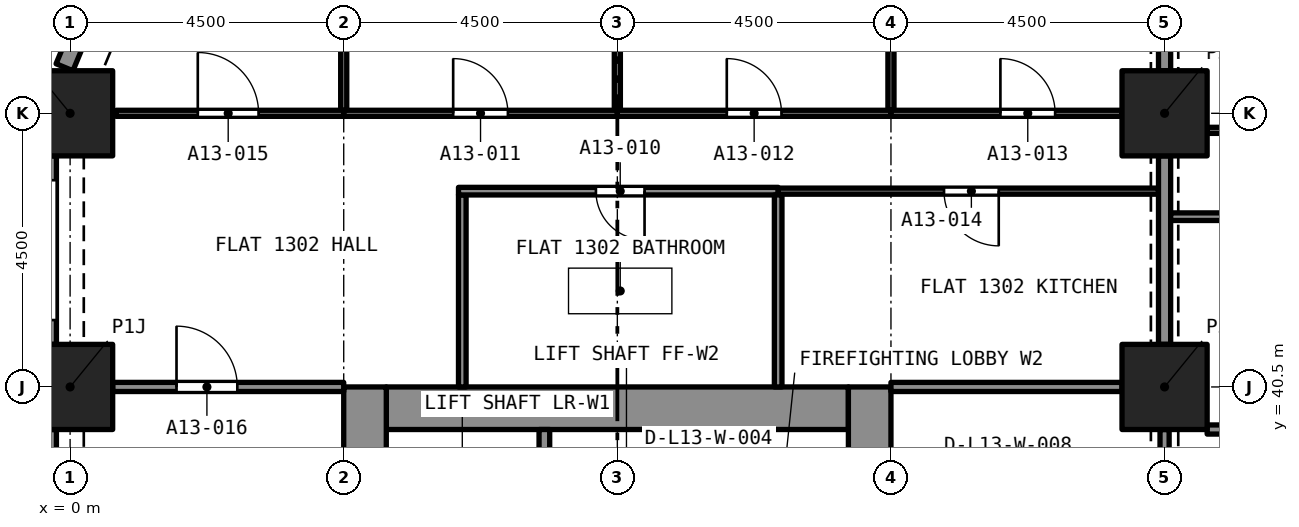
"""IFC4 building model, lengths in metres.
Left out: names, types, materials, properties, quantities, classifications, styles, units other than length and angle.
Written with IfcOpenShell. Run it as: python <this file> out.ifc"""

import sys

from ifc_helpers import new_model, si_unit, direction, frame, frame_2d, origin, origin_2d, place, context, subcontext, project, spatial, rectangle, extrude, element, fill, save


model = new_model("IFC4")
c1 = context("Model", 3, precision=1e-05, world=origin(), true_north=direction((0.0, 1.0)))
c2 = subcontext(c1, "Body", "Model", "MODEL_VIEW")
j1 = project(units=[si_unit("LENGTHUNIT", "METRE"), si_unit("PLANEANGLEUNIT", "RADIAN")], contexts=[c1])
p1 = place(None, origin())
s1 = spatial("IfcSite", under=j1, at=p1, CompositionType="ELEMENT")
p2 = place(p1, origin())
s2 = spatial("IfcBuilding", under=s1, at=p2, CompositionType="ELEMENT")
p3 = place(p2, frame((0.0, 0.0, 52.8)))
s3 = spatial("IfcBuildingStorey", under=s2, at=p3, CompositionType="ELEMENT", Elevation=52.8)
for number, where, z_axis, x_axis in (
    (1, (0.0, 40.5, 0.0), (0.0, 0.0, 1.0), (1.0, 0.0, 0.0)),
    (2, (18.0, 40.5, 0.0), (0.0, 0.0, 1.0), (1.0, 0.0, 0.0)),
    (3, (0.0, 45.0, 0.0), (0.0, 0.0, 1.0), (1.0, 0.0, 0.0)),
    (4, (18.0, 45.0, 0.0), (0.0, 0.0, 1.0), (1.0, 0.0, 0.0)),
):
    element("IfcColumn", number, at=place(p3, frame(where, z_axis=z_axis, x_axis=x_axis)), inside=s3, PredefinedType="COLUMN", context=c2, shape_type="SweptSolid", body=[
        extrude(rectangle(XDim=1.4, YDim=1.4, at=origin_2d()), origin(), (0.0, 0.0, 1.0), 3.2),
    ])
p4 = place(p3, frame((5.2, 40.15, 0.0), z_axis=(0.0, 0.0, 1.0), x_axis=(1.0, 0.0, 0.0)))
e5 = element("IfcWall", 5, at=p4, inside=s3, PredefinedType="SOLIDWALL", context=c2, shape_type="SweptSolid", body=[
    extrude(rectangle(XDim=7.6, YDim=0.7, at=frame_2d((3.8, 0.0))), origin(), (0.0, 0.0, 1.0), 3.2),
])
p5 = place(p3, frame((4.85, 27.0, 0.0), z_axis=(0.0, 0.0, 1.0), x_axis=(0.0, 1.0, 0.0)))
e6 = element("IfcWall", 6, at=p5, inside=s3, PredefinedType="SOLIDWALL", context=c2, shape_type="SweptSolid", body=[
    extrude(rectangle(XDim=13.5, YDim=0.7, at=frame_2d((6.75, 0.0))), origin(), (0.0, 0.0, 1.0), 3.2),
])
p6 = place(p5, frame((8.95, 0.0, 0.0)))
e7 = element("IfcOpeningElement", 7, at=p6, cuts=e6, PredefinedType="OPENING", context=c2, shape_type="SweptSolid", body=[
    extrude(rectangle(XDim=1.2, YDim=2.1, at=frame_2d((0.6, 1.05))), frame((0.0, 0.36, 0.0), z_axis=(0.0, -1.0, 0.0), x_axis=(1.0, 0.0, 0.0)), (0.0, 0.0, 1.0), 0.72),
])
p7 = place(p3, frame((13.15, 27.0, 0.0), z_axis=(0.0, 0.0, 1.0), x_axis=(0.0, 1.0, 0.0)))
e8 = element("IfcWall", 8, at=p7, inside=s3, PredefinedType="SOLIDWALL", context=c2, shape_type="SweptSolid", body=[
    extrude(rectangle(XDim=13.5, YDim=0.7, at=frame_2d((6.75, 0.0))), origin(), (0.0, 0.0, 1.0), 3.2),
])
p8 = place(p7, frame((11.1, 0.0, 0.0)))
e9 = element("IfcOpeningElement", 9, at=p8, cuts=e8, PredefinedType="OPENING", context=c2, shape_type="SweptSolid", body=[
    extrude(rectangle(XDim=1.1, YDim=2.1, at=frame_2d((0.55, 1.05))), frame((0.0, 0.36, 0.0), z_axis=(0.0, -1.0, 0.0), x_axis=(1.0, 0.0, 0.0)), (0.0, 0.0, 1.0), 0.72),
])
p9 = place(p7, frame((8.95, 0.0, 0.0)))
e10 = element("IfcOpeningElement", 10, at=p9, cuts=e8, PredefinedType="OPENING", context=c2, shape_type="SweptSolid", body=[
    extrude(rectangle(XDim=1.2, YDim=2.1, at=frame_2d((0.6, 1.05))), frame((0.0, 0.36, 0.0), z_axis=(0.0, -1.0, 0.0), x_axis=(1.0, 0.0, 0.0)), (0.0, 0.0, 1.0), 0.72),
])
p10 = place(p3, frame((-0.092, 45.757, 0.0), z_axis=(0.0, 0.0, 1.0), x_axis=(0.382737135771, 0.923857286003, 0.0)))
e11 = element("IfcWall", 11, at=p10, inside=s3, PredefinedType="SOLIDWALL", context=c2, shape_type="SweptSolid", body=[
    extrude(rectangle(XDim=1.865, YDim=0.3, at=frame_2d((0.933, 0.0))), origin(), (0.0, 0.0, 1.0), 3.2),
])
p11 = place(p10, frame((0.508, 0.0, 0.45)))
e12 = element("IfcOpeningElement", 12, at=p11, cuts=e11, PredefinedType="OPENING", context=c2, shape_type="SweptSolid", body=[
    extrude(rectangle(XDim=1.1, YDim=1.95, at=frame_2d((0.55, 0.975))), frame((0.0, 0.16, 0.0), z_axis=(0.0, -1.0, 0.0), x_axis=(1.0, 0.0, 0.0)), (0.0, 0.0, 1.0), 0.32),
])
p12 = place(p3, frame((-0.375, 41.2, 0.0), z_axis=(0.0, 0.0, 1.0), x_axis=(0.0, 1.0, 0.0)))
e13 = element("IfcWall", 13, at=p12, inside=s3, PredefinedType="SOLIDWALL", context=c2, shape_type="SweptSolid", body=[
    extrude(rectangle(XDim=3.1, YDim=0.3, at=frame_2d((1.55, 0.0))), origin(), (0.0, 0.0, 1.0), 3.2),
])
p13 = place(p12, frame((0.4, 0.0, 0.45)))
e14 = element("IfcOpeningElement", 14, at=p13, cuts=e13, PredefinedType="OPENING", context=c2, shape_type="SweptSolid", body=[
    extrude(rectangle(XDim=2.3, YDim=1.95, at=frame_2d((1.15, 0.975))), frame((0.0, 0.16, 0.0), z_axis=(0.0, -1.0, 0.0), x_axis=(1.0, 0.0, 0.0)), (0.0, 0.0, 1.0), 0.32),
])
p14 = place(p3, frame((-0.375, 36.7, 0.0), z_axis=(0.0, 0.0, 1.0), x_axis=(0.0, 1.0, 0.0)))
e15 = element("IfcWall", 15, at=p14, inside=s3, PredefinedType="SOLIDWALL", context=c2, shape_type="SweptSolid", body=[
    extrude(rectangle(XDim=3.1, YDim=0.3, at=frame_2d((1.55, 0.0))), origin(), (0.0, 0.0, 1.0), 3.2),
])
p15 = place(p14, frame((0.4, 0.0, 0.45)))
e16 = element("IfcOpeningElement", 16, at=p15, cuts=e15, PredefinedType="OPENING", context=c2, shape_type="SweptSolid", body=[
    extrude(rectangle(XDim=2.3, YDim=1.95, at=frame_2d((1.15, 0.975))), frame((0.0, 0.16, 0.0), z_axis=(0.0, -1.0, 0.0), x_axis=(1.0, 0.0, 0.0)), (0.0, 0.0, 1.0), 0.32),
])
p16 = place(p3, frame((6.45, 40.5, 0.0), z_axis=(0.0, 0.0, 1.0), x_axis=(0.0, 1.0, 0.0)))
e17 = element("IfcWall", 17, at=p16, inside=s3, PredefinedType="PARTITIONING", context=c2, shape_type="SweptSolid", body=[
    extrude(rectangle(XDim=3.157, YDim=0.125, at=frame_2d((1.579, 0.0))), origin(), (0.0, 0.0, 1.0), 2.9),
])
p17 = place(p3, frame((11.645, 43.72, 0.0), z_axis=(0.0, 0.0, 1.0), x_axis=(-1.0, 0.0, 0.0)))
e18 = element("IfcWall", 18, at=p17, inside=s3, PredefinedType="PARTITIONING", context=c2, shape_type="SweptSolid", body=[
    extrude(rectangle(XDim=5.258, YDim=0.125, at=frame_2d((2.629, 0.0))), origin(), (0.0, 0.0, 1.0), 2.9),
])
p18 = place(p17, frame((2.198, 0.0, 0.0)))
e19 = element("IfcOpeningElement", 19, at=p18, cuts=e18, PredefinedType="OPENING", context=c2, shape_type="SweptSolid", body=[
    extrude(rectangle(XDim=0.8, YDim=2.1, at=frame_2d((0.4, 1.05))), frame((0.0, 0.073, 0.0), z_axis=(0.0, -1.0, 0.0), x_axis=(1.0, 0.0, 0.0)), (0.0, 0.0, 1.0), 0.145),
])
p19 = place(p3, frame((11.645, 40.5, 0.0), z_axis=(0.0, 0.0, 1.0), x_axis=(0.0, 1.0, 0.0)))
e20 = element("IfcWall", 20, at=p19, inside=s3, PredefinedType="PARTITIONING", context=c2, shape_type="SweptSolid", body=[
    extrude(rectangle(XDim=3.157, YDim=0.125, at=frame_2d((1.579, 0.0))), origin(), (0.0, 0.0, 1.0), 2.9),
])
p20 = place(p3, frame((9.0, 45.05, 0.0), z_axis=(0.0, 0.0, 1.0), x_axis=(0.0, 1.0, 0.0)))
e21 = element("IfcWall", 21, at=p20, inside=s3, PredefinedType="PARTITIONING", context=c2, shape_type="SweptSolid", body=[
    extrude(rectangle(XDim=3.75, YDim=0.1, at=frame_2d((1.875, 0.0))), origin(), (0.0, 0.0, 1.0), 2.9),
])
p21 = place(p3, frame((4.5, 45.0, 0.0), z_axis=(0.0, 0.0, 1.0), x_axis=(1.0, 0.0, 0.0)))
e22 = element("IfcWall", 22, at=p21, inside=s3, PredefinedType="PARTITIONING", context=c2, shape_type="SweptSolid", body=[
    extrude(rectangle(XDim=4.5, YDim=0.1, at=frame_2d((2.25, 0.0))), origin(), (0.0, 0.0, 1.0), 2.9),
])
p22 = place(p21, frame((1.8, 0.0, 0.0)))
e23 = element("IfcOpeningElement", 23, at=p22, cuts=e22, PredefinedType="OPENING", context=c2, shape_type="SweptSolid", body=[
    extrude(rectangle(XDim=0.9, YDim=2.1, at=frame_2d((0.45, 1.05))), frame((0.0, 0.06, 0.0), z_axis=(0.0, -1.0, 0.0), x_axis=(1.0, 0.0, 0.0)), (0.0, 0.0, 1.0), 0.12),
])
p23 = place(p3, frame((4.5, 45.05, 0.0), z_axis=(0.0, 0.0, 1.0), x_axis=(0.0, 1.0, 0.0)))
e24 = element("IfcWall", 24, at=p23, inside=s3, PredefinedType="PARTITIONING", context=c2, shape_type="SweptSolid", body=[
    extrude(rectangle(XDim=3.692, YDim=0.1, at=frame_2d((1.846, 0.0))), origin(), (0.0, 0.0, 1.0), 2.9),
])
p24 = place(p3, frame((13.5, 45.05, 0.0), z_axis=(0.0, 0.0, 1.0), x_axis=(0.0, 1.0, 0.0)))
e25 = element("IfcWall", 25, at=p24, inside=s3, PredefinedType="PARTITIONING", context=c2, shape_type="SweptSolid", body=[
    extrude(rectangle(XDim=3.75, YDim=0.1, at=frame_2d((1.875, 0.0))), origin(), (0.0, 0.0, 1.0), 2.9),
])
p25 = place(p3, frame((9.0, 45.0, 0.0), z_axis=(0.0, 0.0, 1.0), x_axis=(1.0, 0.0, 0.0)))
e26 = element("IfcWall", 26, at=p25, inside=s3, PredefinedType="PARTITIONING", context=c2, shape_type="SweptSolid", body=[
    extrude(rectangle(XDim=4.5, YDim=0.1, at=frame_2d((2.25, 0.0))), origin(), (0.0, 0.0, 1.0), 2.9),
])
p26 = place(p25, frame((1.8, 0.0, 0.0)))
e27 = element("IfcOpeningElement", 27, at=p26, cuts=e26, PredefinedType="OPENING", context=c2, shape_type="SweptSolid", body=[
    extrude(rectangle(XDim=0.9, YDim=2.1, at=frame_2d((0.45, 1.05))), frame((0.0, 0.06, 0.0), z_axis=(0.0, -1.0, 0.0), x_axis=(1.0, 0.0, 0.0)), (0.0, 0.0, 1.0), 0.12),
])
p27 = place(p3, frame((13.5, 45.0, 0.0), z_axis=(0.0, 0.0, 1.0), x_axis=(1.0, 0.0, 0.0)))
e28 = element("IfcWall", 28, at=p27, inside=s3, PredefinedType="PARTITIONING", context=c2, shape_type="SweptSolid", body=[
    extrude(rectangle(XDim=3.8, YDim=0.1, at=frame_2d((1.9, 0.0))), origin(), (0.0, 0.0, 1.0), 2.9),
])
p28 = place(p27, frame((1.8, 0.0, 0.0)))
e29 = element("IfcOpeningElement", 29, at=p28, cuts=e28, PredefinedType="OPENING", context=c2, shape_type="SweptSolid", body=[
    extrude(rectangle(XDim=0.9, YDim=2.1, at=frame_2d((0.45, 1.05))), frame((0.0, 0.06, 0.0), z_axis=(0.0, -1.0, 0.0), x_axis=(1.0, 0.0, 0.0)), (0.0, 0.0, 1.0), 0.12),
])
p29 = place(p3, frame((18.0, 45.7, 0.0), z_axis=(0.0, 0.0, 1.0), x_axis=(0.0, 1.0, 0.0)))
e30 = element("IfcWall", 30, at=p29, inside=s3, PredefinedType="PARTITIONING", context=c2, shape_type="SweptSolid", body=[
    extrude(rectangle(XDim=3.1, YDim=0.2, at=frame_2d((1.55, 0.0))), origin(), (0.0, 0.0, 1.0), 2.38),
])
p30 = place(p3, frame((17.9, 43.72, 0.0), z_axis=(0.0, 0.0, 1.0), x_axis=(-1.0, 0.0, 0.0)))
e31 = element("IfcWall", 31, at=p30, inside=s3, PredefinedType="PARTITIONING", context=c2, shape_type="SweptSolid", body=[
    extrude(rectangle(XDim=6.255, YDim=0.1, at=frame_2d((3.127, 0.0))), origin(), (0.0, 0.0, 1.0), 2.9),
])
p31 = place(p30, frame((2.627, 0.0, 0.0)))
e32 = element("IfcOpeningElement", 32, at=p31, cuts=e31, PredefinedType="OPENING", context=c2, shape_type="SweptSolid", body=[
    extrude(rectangle(XDim=0.9, YDim=2.1, at=frame_2d((0.45, 1.05))), frame((0.0, 0.06, 0.0), z_axis=(0.0, -1.0, 0.0), x_axis=(1.0, 0.0, 0.0)), (0.0, 0.0, 1.0), 0.12),
])
p32 = place(p3, frame((0.758, 45.0, 0.0), z_axis=(0.0, 0.0, 1.0), x_axis=(1.0, 0.0, 0.0)))
e33 = element("IfcWall", 33, at=p32, inside=s3, PredefinedType="PARTITIONING", context=c2, shape_type="SweptSolid", body=[
    extrude(rectangle(XDim=3.742, YDim=0.1, at=frame_2d((1.871, 0.0))), origin(), (0.0, 0.0, 1.0), 2.9),
])
p33 = place(p32, frame((1.342, 0.0, 0.0)))
e34 = element("IfcOpeningElement", 34, at=p33, cuts=e33, PredefinedType="OPENING", context=c2, shape_type="SweptSolid", body=[
    extrude(rectangle(XDim=1.0, YDim=2.1, at=frame_2d((0.5, 1.05))), frame((0.0, 0.06, 0.0), z_axis=(0.0, -1.0, 0.0), x_axis=(1.0, 0.0, 0.0)), (0.0, 0.0, 1.0), 0.12),
])
p34 = place(p3, frame((0.7, 40.5, 0.0), z_axis=(0.0, 0.0, 1.0), x_axis=(1.0, 0.0, 0.0)))
e35 = element("IfcWall", 35, at=p34, inside=s3, PredefinedType="PARTITIONING", context=c2, shape_type="SweptSolid", body=[
    extrude(rectangle(XDim=3.8, YDim=0.15, at=frame_2d((1.9, 0.0))), origin(), (0.0, 0.0, 1.0), 2.9),
])
p35 = place(p34, frame((1.05, 0.0, 0.0)))
e36 = element("IfcOpeningElement", 36, at=p35, cuts=e35, PredefinedType="OPENING", context=c2, shape_type="SweptSolid", body=[
    extrude(rectangle(XDim=1.0, YDim=2.1, at=frame_2d((0.5, 1.05))), frame((0.0, 0.085, 0.0), z_axis=(0.0, -1.0, 0.0), x_axis=(1.0, 0.0, 0.0)), (0.0, 0.0, 1.0), 0.17),
])
p36 = place(p3, frame((18.0, 41.2, 0.0), z_axis=(0.0, 0.0, 1.0), x_axis=(0.0, 1.0, 0.0)))
e37 = element("IfcWall", 37, at=p36, inside=s3, PredefinedType="PARTITIONING", context=c2, shape_type="SweptSolid", body=[
    extrude(rectangle(XDim=3.1, YDim=0.2, at=frame_2d((1.55, 0.0))), origin(), (0.0, 0.0, 1.0), 2.38),
])
p37 = place(p3, frame((13.5, 40.5, 0.0), z_axis=(0.0, 0.0, 1.0), x_axis=(1.0, 0.0, 0.0)))
e38 = element("IfcWall", 38, at=p37, inside=s3, PredefinedType="PARTITIONING", context=c2, shape_type="SweptSolid", body=[
    extrude(rectangle(XDim=3.8, YDim=0.15, at=frame_2d((1.9, 0.0))), origin(), (0.0, 0.0, 1.0), 2.9),
])
p38 = place(p3, frame((24.212, 43.3, 0.0), z_axis=(0.0, 0.0, 1.0), x_axis=(-1.0, 0.0, 0.0)))
e39 = element("IfcWall", 39, at=p38, inside=s3, PredefinedType="PARTITIONING", context=c2, shape_type="SweptSolid", body=[
    extrude(rectangle(XDim=6.112, YDim=0.125, at=frame_2d((3.056, 0.0))), origin(), (0.0, 0.0, 1.0), 2.75),
])
p39 = place(p38, frame((2.738, 0.0, 0.0)))
e40 = element("IfcOpeningElement", 40, at=p39, cuts=e39, PredefinedType="OPENING", context=c2, shape_type="SweptSolid", body=[
    extrude(rectangle(XDim=0.8, YDim=2.1, at=frame_2d((0.4, 1.05))), frame((0.0, 0.073, 0.0), z_axis=(0.0, -1.0, 0.0), x_axis=(1.0, 0.0, 0.0)), (0.0, 0.0, 1.0), 0.145),
])
p40 = place(p3, frame((18.7, 39.8, 0.0), z_axis=(0.0, 0.0, 1.0), x_axis=(1.0, 0.0, 0.0)))
e41 = element("IfcWall", 41, at=p40, inside=s3, PredefinedType="PARTITIONING", context=c2, shape_type="SweptSolid", body=[
    extrude(rectangle(XDim=5.45, YDim=0.15, at=frame_2d((2.725, 0.0))), origin(), (0.0, 0.0, 1.0), 2.75),
])
p41 = place(p3, frame((18.7, 44.72, 0.0), z_axis=(0.0, 0.0, 1.0), x_axis=(1.0, 0.0, 0.0)))
e42 = element("IfcWall", 42, at=p41, inside=s3, PredefinedType="PARTITIONING", context=c2, shape_type="SweptSolid", body=[
    extrude(rectangle(XDim=3.8, YDim=0.1, at=frame_2d((1.9, 0.0))), origin(), (0.0, 0.0, 1.0), 2.75),
])
p42 = place(p41, frame((1.05, 0.0, 0.0)))
e43 = element("IfcOpeningElement", 43, at=p42, cuts=e42, PredefinedType="OPENING", context=c2, shape_type="SweptSolid", body=[
    extrude(rectangle(XDim=1.0, YDim=2.1, at=frame_2d((0.5, 1.05))), frame((0.0, 0.06, 0.0), z_axis=(0.0, -1.0, 0.0), x_axis=(1.0, 0.0, 0.0)), (0.0, 0.0, 1.0), 0.12),
])
p43 = place(p3, frame((18.0, 39.8, 0.0), z_axis=(0.0, 0.0, 1.0), x_axis=(0.0, -1.0, 0.0)))
e44 = element("IfcWall", 44, at=p43, inside=s3, PredefinedType="PARTITIONING", context=c2, shape_type="SweptSolid", body=[
    extrude(rectangle(XDim=3.1, YDim=0.15, at=frame_2d((1.55, 0.0))), origin(), (0.0, 0.0, 1.0), 2.38),
])
p44 = place(p43, frame((0.95, 0.0, 0.0)))
e45 = element("IfcOpeningElement", 45, at=p44, cuts=e44, PredefinedType="OPENING", context=c2, shape_type="SweptSolid", body=[
    extrude(rectangle(XDim=1.2, YDim=2.1, at=frame_2d((0.6, 1.05))), frame((0.0, 0.085, 0.0), z_axis=(0.0, -1.0, 0.0), x_axis=(1.0, 0.0, 0.0)), (0.0, 0.0, 1.0), 0.17),
])
p45 = place(p3, frame((7.8, 37.5, 0.0), z_axis=(0.0, 0.0, 1.0), x_axis=(0.0, 1.0, 0.0)))
e46 = element("IfcWall", 46, at=p45, inside=s3, PredefinedType="SOLIDWALL", context=c2, shape_type="SweptSolid", body=[
    extrude(rectangle(XDim=2.3, YDim=0.175, at=frame_2d((1.15, 0.0))), origin(), (0.0, 0.0, 1.0), 2.9),
])
p46 = place(p3, frame((10.5, 37.5, 0.0), z_axis=(0.0, 0.0, 1.0), x_axis=(0.0, 1.0, 0.0)))
e47 = element("IfcWall", 47, at=p46, inside=s3, PredefinedType="SOLIDWALL", context=c2, shape_type="SweptSolid", body=[
    extrude(rectangle(XDim=2.3, YDim=0.175, at=frame_2d((1.15, 0.0))), origin(), (0.0, 0.0, 1.0), 2.9),
])
p47 = place(p46, frame((0.65, 0.0, 0.0)))
e48 = element("IfcOpeningElement", 48, at=p47, cuts=e47, PredefinedType="OPENING", context=c2, shape_type="SweptSolid", body=[
    extrude(rectangle(XDim=1.0, YDim=2.1, at=frame_2d((0.5, 1.05))), frame((0.0, 0.097, 0.0), z_axis=(0.0, -1.0, 0.0), x_axis=(1.0, 0.0, 0.0)), (0.0, 0.0, 1.0), 0.195),
])
p48 = place(p18, origin())
e49 = element("IfcDoor", 49, at=p48, inside=s3, OperationType="SINGLE_SWING_LEFT", PredefinedType="DOOR", context=c2, shape_type="SweptSolid", body=[
    extrude(rectangle(XDim=0.8, YDim=2.1, at=frame_2d((0.4, 1.05))), frame((0.0, 0.025, 0.0), z_axis=(0.0, -1.0, 0.0), x_axis=(1.0, 0.0, 0.0)), (0.0, 0.0, 1.0), 0.05),
])
fill(e19, e49)
p49 = place(p22, origin())
e50 = element("IfcDoor", 50, at=p49, inside=s3, OperationType="SINGLE_SWING_RIGHT", PredefinedType="DOOR", context=c2, shape_type="SweptSolid", body=[
    extrude(rectangle(XDim=0.9, YDim=2.1, at=frame_2d((0.45, 1.05))), frame((0.0, 0.025, 0.0), z_axis=(0.0, -1.0, 0.0), x_axis=(1.0, 0.0, 0.0)), (0.0, 0.0, 1.0), 0.05),
])
fill(e23, e50)
p50 = place(p26, origin())
e51 = element("IfcDoor", 51, at=p50, inside=s3, OperationType="SINGLE_SWING_LEFT", PredefinedType="DOOR", context=c2, shape_type="SweptSolid", body=[
    extrude(rectangle(XDim=0.9, YDim=2.1, at=frame_2d((0.45, 1.05))), frame((0.0, 0.025, 0.0), z_axis=(0.0, -1.0, 0.0), x_axis=(1.0, 0.0, 0.0)), (0.0, 0.0, 1.0), 0.05),
])
fill(e27, e51)
p51 = place(p28, origin())
e52 = element("IfcDoor", 52, at=p51, inside=s3, OperationType="SINGLE_SWING_RIGHT", PredefinedType="DOOR", context=c2, shape_type="SweptSolid", body=[
    extrude(rectangle(XDim=0.9, YDim=2.1, at=frame_2d((0.45, 1.05))), frame((0.0, 0.025, 0.0), z_axis=(0.0, -1.0, 0.0), x_axis=(1.0, 0.0, 0.0)), (0.0, 0.0, 1.0), 0.05),
])
fill(e29, e52)
p52 = place(p31, origin())
e53 = element("IfcDoor", 53, at=p52, inside=s3, OperationType="SINGLE_SWING_LEFT", PredefinedType="DOOR", context=c2, shape_type="SweptSolid", body=[
    extrude(rectangle(XDim=0.9, YDim=2.1, at=frame_2d((0.45, 1.05))), frame((0.0, 0.025, 0.0), z_axis=(0.0, -1.0, 0.0), x_axis=(1.0, 0.0, 0.0)), (0.0, 0.0, 1.0), 0.05),
])
fill(e32, e53)
p53 = place(p33, origin())
e54 = element("IfcDoor", 54, at=p53, inside=s3, OperationType="SINGLE_SWING_LEFT", PredefinedType="DOOR", context=c2, shape_type="SweptSolid", body=[
    extrude(rectangle(XDim=1.0, YDim=2.1, at=frame_2d((0.5, 1.05))), frame((0.0, 0.025, 0.0), z_axis=(0.0, -1.0, 0.0), x_axis=(1.0, 0.0, 0.0)), (0.0, 0.0, 1.0), 0.05),
])
fill(e34, e54)
p54 = place(p35, origin())
e55 = element("IfcDoor", 55, at=p54, inside=s3, OperationType="SINGLE_SWING_LEFT", PredefinedType="DOOR", context=c2, shape_type="SweptSolid", body=[
    extrude(rectangle(XDim=1.0, YDim=2.1, at=frame_2d((0.5, 1.05))), frame((0.0, 0.025, 0.0), z_axis=(0.0, -1.0, 0.0), x_axis=(1.0, 0.0, 0.0)), (0.0, 0.0, 1.0), 0.05),
])
fill(e36, e55)
save(model, sys.argv[1])
